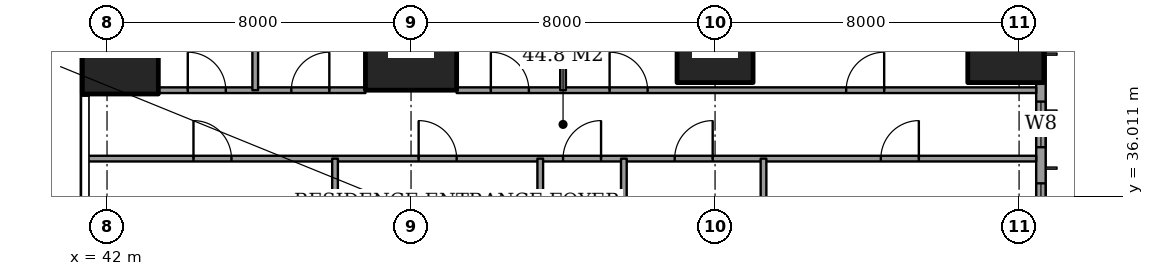
"""IFC4 building model, lengths in metres.
Left out: names, types, materials, properties, quantities, classifications, styles, units other than length and angle.
Written with IfcOpenShell. Run it as: python <this file> out.ifc"""

import sys

from ifc_helpers import new_model, si_unit, direction, frame, frame_2d, origin, origin_2d, place, context, subcontext, project, spatial, rectangle, extrude, element, fill, save


model = new_model("IFC4")
c1 = context("Model", 3, precision=1e-05, world=origin(), true_north=direction((0.0, 1.0)))
c2 = subcontext(c1, "Body", "Model", "MODEL_VIEW")
j1 = project(units=[si_unit("LENGTHUNIT", "METRE"), si_unit("PLANEANGLEUNIT", "RADIAN")], contexts=[c1])
p1 = place(None, origin())
s1 = spatial("IfcSite", under=j1, at=p1, CompositionType="ELEMENT")
p2 = place(p1, origin())
s2 = spatial("IfcBuilding", under=s1, at=p2, CompositionType="ELEMENT")
p3 = place(p2, frame((0.0, 0.0, 51.2)))
s3 = spatial("IfcBuildingStorey", under=s2, at=p3, CompositionType="ELEMENT", Elevation=51.2)
p4 = place(p3, frame((42.35, 40.0, 0.0), z_axis=(0.0, 0.0, 1.0), x_axis=(1.0, 0.0, 0.0)))
e1 = element("IfcColumn", 1, at=p4, inside=s3, PredefinedType="COLUMN", context=c2, shape_type="SweptSolid", body=[
    extrude(rectangle(XDim=2.0, YDim=2.6, at=origin_2d()), origin(), (0.0, 0.0, 1.0), 3.6),
])
p5 = place(p3, frame((50.0, 40.0, 0.0), z_axis=(0.0, 0.0, 1.0), x_axis=(1.0, 0.0, 0.0)))
e2 = element("IfcColumn", 2, at=p5, inside=s3, PredefinedType="COLUMN", context=c2, shape_type="SweptSolid", body=[
    extrude(rectangle(XDim=2.4, YDim=2.4, at=origin_2d()), origin(), (0.0, 0.0, 1.0), 3.6),
])
for number, where, z_axis, x_axis in (
    (3, (58.0, 40.0, 0.0), (0.0, 0.0, 1.0), (1.0, 0.0, 0.0)),
    (4, (65.65, 40.0, 0.0), (0.0, 0.0, 1.0), (1.0, 0.0, 0.0)),
):
    element("IfcColumn", number, at=place(p3, frame(where, z_axis=z_axis, x_axis=x_axis)), inside=s3, PredefinedType="COLUMN", context=c2, shape_type="SweptSolid", body=[
        extrude(rectangle(XDim=2.0, YDim=2.0, at=origin_2d()), origin(), (0.0, 0.0, 1.0), 3.6),
    ])
p6 = place(p3, frame((66.575, 3.175, 0.0), z_axis=(0.0, 0.0, 1.0), x_axis=(0.0, 1.0, 0.0)))
e5 = element("IfcWall", 5, at=p6, inside=s3, PredefinedType="SOLIDWALL", context=c2, shape_type="SweptSolid", body=[
    extrude(rectangle(XDim=41.65, YDim=0.25, at=frame_2d((20.825, 0.0))), origin(), (0.0, 0.0, 1.0), 3.6),
])
p7 = place(p6, frame((0.775, 0.0, 0.6)))
e6 = element("IfcOpeningElement", 6, at=p7, cuts=e5, PredefinedType="OPENING", context=c2, shape_type="SweptSolid", body=[
    extrude(rectangle(XDim=2.4, YDim=2.0, at=frame_2d((1.2, 1.0))), frame((0.0, 0.135, 0.0), z_axis=(0.0, -1.0, 0.0), x_axis=(1.0, 0.0, 0.0)), (0.0, 0.0, 1.0), 0.27),
])
p8 = place(p6, frame((6.125, 0.0, 0.6)))
e7 = element("IfcOpeningElement", 7, at=p8, cuts=e5, PredefinedType="OPENING", context=c2, shape_type="SweptSolid", body=[
    extrude(rectangle(XDim=1.2, YDim=2.0, at=frame_2d((0.6, 1.0))), frame((0.0, 0.135, 0.0), z_axis=(0.0, -1.0, 0.0), x_axis=(1.0, 0.0, 0.0)), (0.0, 0.0, 1.0), 0.27),
])
p9 = place(p6, frame((8.375, 0.0, 0.6)))
e8 = element("IfcOpeningElement", 8, at=p9, cuts=e5, PredefinedType="OPENING", context=c2, shape_type="SweptSolid", body=[
    extrude(rectangle(XDim=2.4, YDim=2.0, at=frame_2d((1.2, 1.0))), frame((0.0, 0.135, 0.0), z_axis=(0.0, -1.0, 0.0), x_axis=(1.0, 0.0, 0.0)), (0.0, 0.0, 1.0), 0.27),
])
p10 = place(p6, frame((15.775, 0.0, 0.6)))
e9 = element("IfcOpeningElement", 9, at=p10, cuts=e5, PredefinedType="OPENING", context=c2, shape_type="SweptSolid", body=[
    extrude(rectangle(XDim=2.4, YDim=2.0, at=frame_2d((1.2, 1.0))), frame((0.0, 0.135, 0.0), z_axis=(0.0, -1.0, 0.0), x_axis=(1.0, 0.0, 0.0)), (0.0, 0.0, 1.0), 0.27),
])
p11 = place(p6, frame((23.475, 0.0, 0.6)))
e10 = element("IfcOpeningElement", 10, at=p11, cuts=e5, PredefinedType="OPENING", context=c2, shape_type="SweptSolid", body=[
    extrude(rectangle(XDim=2.4, YDim=2.0, at=frame_2d((1.2, 1.0))), frame((0.0, 0.135, 0.0), z_axis=(0.0, -1.0, 0.0), x_axis=(1.0, 0.0, 0.0)), (0.0, 0.0, 1.0), 0.27),
])
p12 = place(p6, frame((30.775, 0.0, 0.6)))
e11 = element("IfcOpeningElement", 11, at=p12, cuts=e5, PredefinedType="OPENING", context=c2, shape_type="SweptSolid", body=[
    extrude(rectangle(XDim=2.4, YDim=2.0, at=frame_2d((1.2, 1.0))), frame((0.0, 0.135, 0.0), z_axis=(0.0, -1.0, 0.0), x_axis=(1.0, 0.0, 0.0)), (0.0, 0.0, 1.0), 0.27),
])
p13 = place(p6, frame((34.125, 0.0, 0.6)))
e12 = element("IfcOpeningElement", 12, at=p13, cuts=e5, PredefinedType="OPENING", context=c2, shape_type="SweptSolid", body=[
    extrude(rectangle(XDim=1.2, YDim=2.0, at=frame_2d((0.6, 1.0))), frame((0.0, 0.135, 0.0), z_axis=(0.0, -1.0, 0.0), x_axis=(1.0, 0.0, 0.0)), (0.0, 0.0, 1.0), 0.27),
])
p14 = place(p6, frame((38.475, 0.0, 0.6)))
e13 = element("IfcOpeningElement", 13, at=p14, cuts=e5, PredefinedType="OPENING", context=c2, shape_type="SweptSolid", body=[
    extrude(rectangle(XDim=2.4, YDim=2.0, at=frame_2d((1.2, 1.0))), frame((0.0, 0.135, 0.0), z_axis=(0.0, -1.0, 0.0), x_axis=(1.0, 0.0, 0.0)), (0.0, 0.0, 1.0), 0.27),
])
p15 = place(p3, frame((41.439, 37.0, 0.0), z_axis=(0.0, 0.0, 1.0), x_axis=(1.0, 0.0, 0.0)))
e14 = element("IfcWall", 14, at=p15, inside=s3, PredefinedType="PARTITIONING", context=c2, shape_type="SweptSolid", body=[
    extrude(rectangle(XDim=25.011, YDim=0.15, at=frame_2d((12.505, 0.0))), origin(), (0.0, 0.0, 1.0), 3.35),
])
p16 = place(p15, frame((12.561, 0.0, 0.0)))
e15 = element("IfcOpeningElement", 15, at=p16, cuts=e14, PredefinedType="OPENING", context=c2, shape_type="SweptSolid", body=[
    extrude(rectangle(XDim=1.0, YDim=2.1, at=frame_2d((0.5, 1.05))), frame((0.0, 0.085, 0.0), z_axis=(0.0, -1.0, 0.0), x_axis=(1.0, 0.0, 0.0)), (0.0, 0.0, 1.0), 0.17),
])
p17 = place(p15, frame((20.924, 0.0, 0.0)))
e16 = element("IfcOpeningElement", 16, at=p17, cuts=e14, PredefinedType="OPENING", context=c2, shape_type="SweptSolid", body=[
    extrude(rectangle(XDim=1.0, YDim=2.1, at=frame_2d((0.5, 1.05))), frame((0.0, 0.085, 0.0), z_axis=(0.0, -1.0, 0.0), x_axis=(1.0, 0.0, 0.0)), (0.0, 0.0, 1.0), 0.17),
])
p18 = place(p15, frame((15.499, 0.0, 0.0)))
e17 = element("IfcOpeningElement", 17, at=p18, cuts=e14, PredefinedType="OPENING", context=c2, shape_type="SweptSolid", body=[
    extrude(rectangle(XDim=1.0, YDim=2.1, at=frame_2d((0.5, 1.05))), frame((0.0, 0.085, 0.0), z_axis=(0.0, -1.0, 0.0), x_axis=(1.0, 0.0, 0.0)), (0.0, 0.0, 1.0), 0.17),
])
p19 = place(p15, frame((8.761, 0.0, 0.0)))
e18 = element("IfcOpeningElement", 18, at=p19, cuts=e14, PredefinedType="OPENING", context=c2, shape_type="SweptSolid", body=[
    extrude(rectangle(XDim=1.0, YDim=2.1, at=frame_2d((0.5, 1.05))), frame((0.0, 0.085, 0.0), z_axis=(0.0, -1.0, 0.0), x_axis=(1.0, 0.0, 0.0)), (0.0, 0.0, 1.0), 0.17),
])
p20 = place(p15, frame((2.836, 0.0, 0.0)))
e19 = element("IfcOpeningElement", 19, at=p20, cuts=e14, PredefinedType="OPENING", context=c2, shape_type="SweptSolid", body=[
    extrude(rectangle(XDim=1.0, YDim=2.1, at=frame_2d((0.5, 1.05))), frame((0.0, 0.085, 0.0), z_axis=(0.0, -1.0, 0.0), x_axis=(1.0, 0.0, 0.0)), (0.0, 0.0, 1.0), 0.17),
])
p21 = place(p3, frame((43.35, 38.8, 0.0), z_axis=(0.0, 0.0, 1.0), x_axis=(1.0, 0.0, 0.0)))
e20 = element("IfcWall", 20, at=p21, inside=s3, PredefinedType="PARTITIONING", context=c2, shape_type="SweptSolid", body=[
    extrude(rectangle(XDim=5.45, YDim=0.15, at=frame_2d((2.725, 0.0))), origin(), (0.0, 0.0, 1.0), 3.35),
])
p22 = place(p21, frame((3.5, 0.0, 0.0)))
e21 = element("IfcOpeningElement", 21, at=p22, cuts=e20, PredefinedType="OPENING", context=c2, shape_type="SweptSolid", body=[
    extrude(rectangle(XDim=1.0, YDim=2.1, at=frame_2d((0.5, 1.05))), frame((0.0, 0.085, 0.0), z_axis=(0.0, -1.0, 0.0), x_axis=(1.0, 0.0, 0.0)), (0.0, 0.0, 1.0), 0.17),
])
p23 = place(p21, frame((0.775, 0.0, 0.0)))
e22 = element("IfcOpeningElement", 22, at=p23, cuts=e20, PredefinedType="OPENING", context=c2, shape_type="SweptSolid", body=[
    extrude(rectangle(XDim=1.0, YDim=2.1, at=frame_2d((0.5, 1.05))), frame((0.0, 0.085, 0.0), z_axis=(0.0, -1.0, 0.0), x_axis=(1.0, 0.0, 0.0)), (0.0, 0.0, 1.0), 0.17),
])
p24 = place(p3, frame((51.2, 38.8, 0.0), z_axis=(0.0, 0.0, 1.0), x_axis=(1.0, 0.0, 0.0)))
e23 = element("IfcWall", 23, at=p24, inside=s3, PredefinedType="PARTITIONING", context=c2, shape_type="SweptSolid", body=[
    extrude(rectangle(XDim=15.25, YDim=0.15, at=frame_2d((7.625, 0.0))), origin(), (0.0, 0.0, 1.0), 3.35),
])
p25 = place(p24, frame((10.25, 0.0, 0.0)))
e24 = element("IfcOpeningElement", 24, at=p25, cuts=e23, PredefinedType="OPENING", context=c2, shape_type="SweptSolid", body=[
    extrude(rectangle(XDim=1.0, YDim=2.1, at=frame_2d((0.5, 1.05))), frame((0.0, 0.085, 0.0), z_axis=(0.0, -1.0, 0.0), x_axis=(1.0, 0.0, 0.0)), (0.0, 0.0, 1.0), 0.17),
])
p26 = place(p24, frame((4.025, 0.0, 0.0)))
e25 = element("IfcOpeningElement", 25, at=p26, cuts=e23, PredefinedType="OPENING", context=c2, shape_type="SweptSolid", body=[
    extrude(rectangle(XDim=1.0, YDim=2.1, at=frame_2d((0.5, 1.05))), frame((0.0, 0.085, 0.0), z_axis=(0.0, -1.0, 0.0), x_axis=(1.0, 0.0, 0.0)), (0.0, 0.0, 1.0), 0.17),
])
p27 = place(p24, frame((0.9, 0.0, 0.0)))
e26 = element("IfcOpeningElement", 26, at=p27, cuts=e23, PredefinedType="OPENING", context=c2, shape_type="SweptSolid", body=[
    extrude(rectangle(XDim=1.0, YDim=2.1, at=frame_2d((0.5, 1.05))), frame((0.0, 0.085, 0.0), z_axis=(0.0, -1.0, 0.0), x_axis=(1.0, 0.0, 0.0)), (0.0, 0.0, 1.0), 0.17),
])
p28 = place(p3, frame((45.9, 38.8, 0.0), z_axis=(0.0, 0.0, 1.0), x_axis=(0.0, 1.0, 0.0)))
e27 = element("IfcWall", 27, at=p28, inside=s3, PredefinedType="PARTITIONING", context=c2, shape_type="SweptSolid", body=[
    extrude(rectangle(XDim=9.65, YDim=0.15, at=frame_2d((4.825, 0.0))), origin(), (0.0, 0.0, 1.0), 3.35),
])
p29 = place(p3, frame((48.0, 31.5, 0.0), z_axis=(0.0, 0.0, 1.0), x_axis=(0.0, 1.0, 0.0)))
e28 = element("IfcWall", 28, at=p29, inside=s3, PredefinedType="PARTITIONING", context=c2, shape_type="SweptSolid", body=[
    extrude(rectangle(XDim=5.5, YDim=0.15, at=frame_2d((2.75, 0.0))), origin(), (0.0, 0.0, 1.0), 3.35),
])
p30 = place(p3, frame((53.4, 30.675, 0.0), z_axis=(0.0, 0.0, 1.0), x_axis=(0.0, 1.0, 0.0)))
e29 = element("IfcWall", 29, at=p30, inside=s3, PredefinedType="PARTITIONING", context=c2, shape_type="SweptSolid", body=[
    extrude(rectangle(XDim=6.325, YDim=0.15, at=frame_2d((3.163, 0.0))), origin(), (0.0, 0.0, 1.0), 3.35),
])
p31 = place(p3, frame((54.0, 38.8, 0.0), z_axis=(0.0, 0.0, 1.0), x_axis=(0.0, 1.0, 0.0)))
e30 = element("IfcWall", 30, at=p31, inside=s3, PredefinedType="PARTITIONING", context=c2, shape_type="SweptSolid", body=[
    extrude(rectangle(XDim=9.65, YDim=0.15, at=frame_2d((4.825, 0.0))), origin(), (0.0, 0.0, 1.0), 3.35),
])
p32 = place(p3, frame((55.6, 28.0, 0.0), z_axis=(0.0, 0.0, 1.0), x_axis=(0.0, 1.0, 0.0)))
e31 = element("IfcWall", 31, at=p32, inside=s3, PredefinedType="PARTITIONING", context=c2, shape_type="SweptSolid", body=[
    extrude(rectangle(XDim=9.0, YDim=0.15, at=frame_2d((4.5, 0.0))), origin(), (0.0, 0.0, 1.0), 3.35),
])
p33 = place(p32, frame((0.837, 0.0, 0.0)))
e32 = element("IfcOpeningElement", 32, at=p33, cuts=e31, PredefinedType="OPENING", context=c2, shape_type="SweptSolid", body=[
    extrude(rectangle(XDim=1.0, YDim=2.1, at=frame_2d((0.5, 1.05))), frame((0.0, 0.085, 0.0), z_axis=(0.0, -1.0, 0.0), x_axis=(1.0, 0.0, 0.0)), (0.0, 0.0, 1.0), 0.17),
])
p34 = place(p3, frame((59.275, 33.2, 0.0), z_axis=(0.0, 0.0, 1.0), x_axis=(0.0, 1.0, 0.0)))
e33 = element("IfcWall", 33, at=p34, inside=s3, PredefinedType="PARTITIONING", context=c2, shape_type="SweptSolid", body=[
    extrude(rectangle(XDim=3.8, YDim=0.15, at=frame_2d((1.9, 0.0))), origin(), (0.0, 0.0, 1.0), 3.35),
])
p35 = place(p12, origin())
e34 = element("IfcWindow", 34, at=p35, inside=s3, PartitioningType="SINGLE_PANEL", PredefinedType="WINDOW", context=c2, shape_type="SweptSolid", body=[
    extrude(rectangle(XDim=2.4, YDim=2.0, at=frame_2d((1.2, 1.0))), frame((0.0, 0.03, 0.0), z_axis=(0.0, -1.0, 0.0), x_axis=(1.0, 0.0, 0.0)), (0.0, 0.0, 1.0), 0.06),
])
fill(e11, e34)
p36 = place(p13, origin())
e35 = element("IfcWindow", 35, at=p36, inside=s3, PartitioningType="SINGLE_PANEL", PredefinedType="WINDOW", context=c2, shape_type="SweptSolid", body=[
    extrude(rectangle(XDim=1.2, YDim=2.0, at=frame_2d((0.6, 1.0))), frame((0.0, 0.03, 0.0), z_axis=(0.0, -1.0, 0.0), x_axis=(1.0, 0.0, 0.0)), (0.0, 0.0, 1.0), 0.06),
])
fill(e12, e35)
p37 = place(p25, origin())
e36 = element("IfcDoor", 36, at=p37, inside=s3, OperationType="SINGLE_SWING_LEFT", PredefinedType="DOOR", context=c2, shape_type="SweptSolid", body=[
    extrude(rectangle(XDim=1.0, YDim=2.1, at=frame_2d((0.5, 1.05))), frame((0.0, 0.025, 0.0), z_axis=(0.0, -1.0, 0.0), x_axis=(1.0, 0.0, 0.0)), (0.0, 0.0, 1.0), 0.05),
])
fill(e24, e36)
p38 = place(p26, origin())
e37 = element("IfcDoor", 37, at=p38, inside=s3, OperationType="SINGLE_SWING_RIGHT", PredefinedType="DOOR", context=c2, shape_type="SweptSolid", body=[
    extrude(rectangle(XDim=1.0, YDim=2.1, at=frame_2d((0.5, 1.05))), frame((0.0, 0.025, 0.0), z_axis=(0.0, -1.0, 0.0), x_axis=(1.0, 0.0, 0.0)), (0.0, 0.0, 1.0), 0.05),
])
fill(e25, e37)
p39 = place(p27, origin())
e38 = element("IfcDoor", 38, at=p39, inside=s3, OperationType="SINGLE_SWING_RIGHT", PredefinedType="DOOR", context=c2, shape_type="SweptSolid", body=[
    extrude(rectangle(XDim=1.0, YDim=2.1, at=frame_2d((0.5, 1.05))), frame((0.0, 0.025, 0.0), z_axis=(0.0, -1.0, 0.0), x_axis=(1.0, 0.0, 0.0)), (0.0, 0.0, 1.0), 0.05),
])
fill(e26, e38)
p40 = place(p22, origin())
e39 = element("IfcDoor", 39, at=p40, inside=s3, OperationType="SINGLE_SWING_LEFT", PredefinedType="DOOR", context=c2, shape_type="SweptSolid", body=[
    extrude(rectangle(XDim=1.0, YDim=2.1, at=frame_2d((0.5, 1.05))), frame((0.0, 0.025, 0.0), z_axis=(0.0, -1.0, 0.0), x_axis=(1.0, 0.0, 0.0)), (0.0, 0.0, 1.0), 0.05),
])
fill(e21, e39)
p41 = place(p23, origin())
e40 = element("IfcDoor", 40, at=p41, inside=s3, OperationType="SINGLE_SWING_RIGHT", PredefinedType="DOOR", context=c2, shape_type="SweptSolid", body=[
    extrude(rectangle(XDim=1.0, YDim=2.1, at=frame_2d((0.5, 1.05))), frame((0.0, 0.025, 0.0), z_axis=(0.0, -1.0, 0.0), x_axis=(1.0, 0.0, 0.0)), (0.0, 0.0, 1.0), 0.05),
])
fill(e22, e40)
p42 = place(p16, origin())
e41 = element("IfcDoor", 41, at=p42, inside=s3, OperationType="SINGLE_SWING_LEFT", PredefinedType="DOOR", context=c2, shape_type="SweptSolid", body=[
    extrude(rectangle(XDim=1.0, YDim=2.1, at=frame_2d((0.5, 1.05))), frame((0.0, 0.025, 0.0), z_axis=(0.0, -1.0, 0.0), x_axis=(1.0, 0.0, 0.0)), (0.0, 0.0, 1.0), 0.05),
])
fill(e15, e41)
p43 = place(p17, origin())
e42 = element("IfcDoor", 42, at=p43, inside=s3, OperationType="SINGLE_SWING_LEFT", PredefinedType="DOOR", context=c2, shape_type="SweptSolid", body=[
    extrude(rectangle(XDim=1.0, YDim=2.1, at=frame_2d((0.5, 1.05))), frame((0.0, 0.025, 0.0), z_axis=(0.0, -1.0, 0.0), x_axis=(1.0, 0.0, 0.0)), (0.0, 0.0, 1.0), 0.05),
])
fill(e16, e42)
p44 = place(p18, origin())
e43 = element("IfcDoor", 43, at=p44, inside=s3, OperationType="SINGLE_SWING_LEFT", PredefinedType="DOOR", context=c2, shape_type="SweptSolid", body=[
    extrude(rectangle(XDim=1.0, YDim=2.1, at=frame_2d((0.5, 1.05))), frame((0.0, 0.025, 0.0), z_axis=(0.0, -1.0, 0.0), x_axis=(1.0, 0.0, 0.0)), (0.0, 0.0, 1.0), 0.05),
])
fill(e17, e43)
p45 = place(p19, origin())
e44 = element("IfcDoor", 44, at=p45, inside=s3, OperationType="SINGLE_SWING_RIGHT", PredefinedType="DOOR", context=c2, shape_type="SweptSolid", body=[
    extrude(rectangle(XDim=1.0, YDim=2.1, at=frame_2d((0.5, 1.05))), frame((0.0, 0.025, 0.0), z_axis=(0.0, -1.0, 0.0), x_axis=(1.0, 0.0, 0.0)), (0.0, 0.0, 1.0), 0.05),
])
fill(e18, e44)
p46 = place(p20, origin())
e45 = element("IfcDoor", 45, at=p46, inside=s3, OperationType="SINGLE_SWING_RIGHT", PredefinedType="DOOR", context=c2, shape_type="SweptSolid", body=[
    extrude(rectangle(XDim=1.0, YDim=2.1, at=frame_2d((0.5, 1.05))), frame((0.0, 0.025, 0.0), z_axis=(0.0, -1.0, 0.0), x_axis=(1.0, 0.0, 0.0)), (0.0, 0.0, 1.0), 0.05),
])
fill(e19, e45)
save(model, sys.argv[1])
